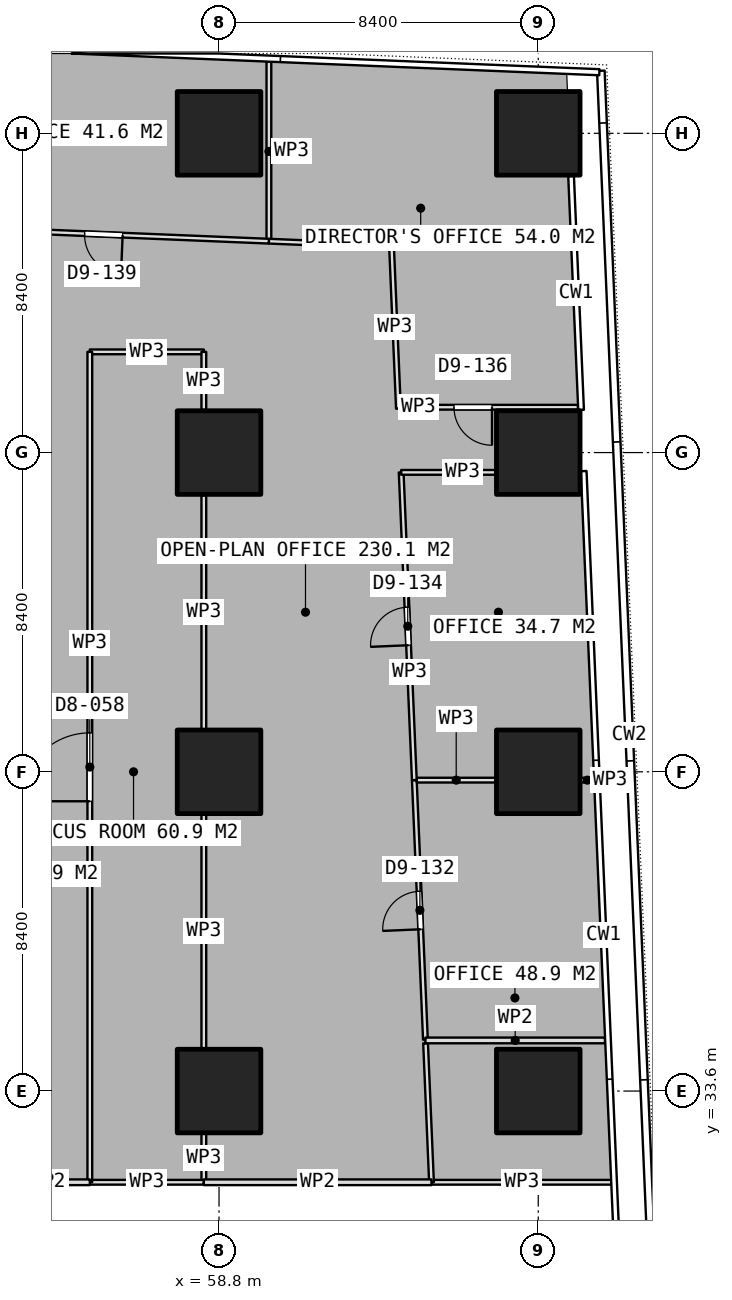
"""IFC4 building model, lengths in metres.
Left out: names, types, materials, properties, quantities, classifications, styles, units other than length and angle.
Written with IfcOpenShell. Run it as: python <this file> out.ifc"""

import sys

from ifc_helpers import new_model, si_unit, direction, frame, frame_2d, origin, origin_2d, place, context, subcontext, project, spatial, rectangle, extrude, element, fill, save


model = new_model("IFC4")
c1 = context("Model", 3, precision=1e-05, world=origin(), true_north=direction((0.0, 1.0)))
c2 = subcontext(c1, "Body", "Model", "MODEL_VIEW")
j1 = project(units=[si_unit("LENGTHUNIT", "METRE"), si_unit("PLANEANGLEUNIT", "RADIAN")], contexts=[c1])
p1 = place(None, origin())
s1 = spatial("IfcSite", under=j1, at=p1, CompositionType="ELEMENT")
p2 = place(p1, origin())
s2 = spatial("IfcBuilding", under=s1, at=p2, CompositionType="ELEMENT")
p3 = place(p2, frame((0.0, 0.0, 47.9)))
s3 = spatial("IfcBuildingStorey", under=s2, at=p3, CompositionType="ELEMENT", Elevation=47.9)
for number, where, z_axis, x_axis in (
    (1, (58.8, 33.6, 0.0), (0.0, 0.0, 1.0), (1.0, 0.0, 0.0)),
    (2, (58.8, 42.0, 0.0), (0.0, 0.0, 1.0), (1.0, 0.0, 0.0)),
    (3, (58.8, 50.4, 0.0), (0.0, 0.0, 1.0), (1.0, 0.0, 0.0)),
    (4, (58.8, 58.8, 0.0), (0.0, 0.0, 1.0), (1.0, 0.0, 0.0)),
    (5, (67.2, 33.6, 0.0), (0.0, 0.0, 1.0), (1.0, 0.0, 0.0)),
    (6, (67.2, 42.0, 0.0), (0.0, 0.0, 1.0), (1.0, 0.0, 0.0)),
    (7, (67.2, 50.4, 0.0), (0.0, 0.0, 1.0), (1.0, 0.0, 0.0)),
    (8, (67.2, 58.8, 0.0), (0.0, 0.0, 1.0), (1.0, 0.0, 0.0)),
):
    element("IfcColumn", number, at=place(p3, frame(where, z_axis=z_axis, x_axis=x_axis)), inside=s3, PredefinedType="COLUMN", context=c2, shape_type="SweptSolid", body=[
        extrude(rectangle(XDim=2.2, YDim=2.2, at=origin_2d()), origin(), (0.0, 0.0, 1.0), 3.75),
    ])
p4 = place(p3, frame((69.145, 31.2, 0.0), z_axis=(0.0, 0.0, 1.0), x_axis=(-1.0, 0.0, 0.0)))
e9 = element("IfcWall", 9, at=p4, inside=s3, PredefinedType="PARTITIONING", context=c2, shape_type="SweptSolid", body=[
    extrude(rectangle(XDim=4.754, YDim=0.125, at=frame_2d((2.377, 0.0))), origin(), (0.0, 0.0, 1.0), 3.5),
])
p5 = place(p3, frame((64.391, 31.2, 0.0), z_axis=(0.0, 0.0, 1.0), x_axis=(-0.042620959322, 0.999091314058, 0.0)))
e10 = element("IfcWall", 10, at=p5, inside=s3, PredefinedType="PARTITIONING", context=c2, shape_type="SweptSolid", body=[
    extrude(rectangle(XDim=3.66, YDim=0.125, at=frame_2d((1.83, 0.0))), origin(), (0.0, 0.0, 1.0), 3.5),
])
p6 = place(p3, frame((64.231, 34.954, 0.0), z_axis=(0.0, 0.0, 1.0), x_axis=(-0.042731736662, 0.999086582175, 0.0)))
e11 = element("IfcWall", 11, at=p6, inside=s3, PredefinedType="PARTITIONING", context=c2, shape_type="SweptSolid", body=[
    extrude(rectangle(XDim=6.833, YDim=0.125, at=frame_2d((3.417, 0.0))), origin(), (0.0, 0.0, 1.0), 3.5),
])
p7 = place(p6, frame((2.905, 0.0, 0.0)))
e12 = element("IfcOpeningElement", 12, at=p7, cuts=e11, PredefinedType="OPENING", context=c2, shape_type="SweptSolid", body=[
    extrude(rectangle(XDim=1.0, YDim=2.1, at=frame_2d((0.5, 1.05))), frame((0.0, 0.073, 0.0), z_axis=(0.0, -1.0, 0.0), x_axis=(1.0, 0.0, 0.0)), (0.0, 0.0, 1.0), 0.145),
])
p8 = place(p3, frame((64.002, 41.781, 0.0), z_axis=(0.0, 0.0, 1.0), x_axis=(1.0, 0.0, 0.0)))
e13 = element("IfcWall", 13, at=p8, inside=s3, PredefinedType="PARTITIONING", context=c2, shape_type="SweptSolid", body=[
    extrude(rectangle(XDim=2.078, YDim=0.125, at=frame_2d((1.039, 0.0))), origin(), (0.0, 0.0, 1.0), 3.5),
])
p9 = place(p3, frame((68.32, 41.781, 0.0), z_axis=(0.0, 0.0, 1.0), x_axis=(1.0, 0.0, 0.0)))
e14 = element("IfcWall", 14, at=p9, inside=s3, PredefinedType="PARTITIONING", context=c2, shape_type="SweptSolid", body=[
    extrude(rectangle(XDim=0.343, YDim=0.125, at=frame_2d((0.171, 0.0))), origin(), (0.0, 0.0, 1.0), 3.5),
])
p10 = place(p3, frame((63.939, 41.782, 0.0), z_axis=(0.0, 0.0, 1.0), x_axis=(-0.042686820675, 0.999088502256, 0.0)))
e15 = element("IfcWall", 15, at=p10, inside=s3, PredefinedType="PARTITIONING", context=c2, shape_type="SweptSolid", body=[
    extrude(rectangle(XDim=8.104, YDim=0.125, at=frame_2d((4.052, 0.0))), origin(), (0.0, 0.0, 1.0), 3.5),
])
p11 = place(p10, frame((3.552, 0.0, 0.0)))
e16 = element("IfcOpeningElement", 16, at=p11, cuts=e15, PredefinedType="OPENING", context=c2, shape_type="SweptSolid", body=[
    extrude(rectangle(XDim=1.0, YDim=2.1, at=frame_2d((0.5, 1.05))), frame((0.0, 0.073, 0.0), z_axis=(0.0, -1.0, 0.0), x_axis=(1.0, 0.0, 0.0)), (0.0, 0.0, 1.0), 0.145),
])
p12 = place(p3, frame((63.593, 49.879, 0.0), z_axis=(0.0, 0.0, 1.0), x_axis=(1.0, 0.0, 0.0)))
e17 = element("IfcWall", 17, at=p12, inside=s3, PredefinedType="PARTITIONING", context=c2, shape_type="SweptSolid", body=[
    extrude(rectangle(XDim=2.487, YDim=0.125, at=frame_2d((1.244, 0.0))), origin(), (0.0, 0.0, 1.0), 3.5),
])
p13 = place(p3, frame((60.112, 55.962, 0.0), z_axis=(0.0, 0.0, 1.0), x_axis=(0.0, 1.0, 0.0)))
e18 = element("IfcWall", 18, at=p13, inside=s3, PredefinedType="PARTITIONING", context=c2, shape_type="SweptSolid", body=[
    extrude(rectangle(XDim=4.724, YDim=0.125, at=frame_2d((2.362, 0.0))), origin(), (0.0, 0.0, 1.0), 3.5),
])
p14 = place(p3, frame((68.244, 51.593, 0.0), z_axis=(0.0, 0.0, 1.0), x_axis=(-1.0, 0.0, 0.0)))
e19 = element("IfcWall", 19, at=p14, inside=s3, PredefinedType="PARTITIONING", context=c2, shape_type="SweptSolid", body=[
    extrude(rectangle(XDim=4.662, YDim=0.125, at=frame_2d((2.331, 0.0))), origin(), (0.0, 0.0, 1.0), 3.5),
])
p15 = place(p14, frame((2.261, 0.0, 0.0)))
e20 = element("IfcOpeningElement", 20, at=p15, cuts=e19, PredefinedType="OPENING", context=c2, shape_type="SweptSolid", body=[
    extrude(rectangle(XDim=1.0, YDim=2.1, at=frame_2d((0.5, 1.05))), frame((0.0, 0.073, 0.0), z_axis=(0.0, -1.0, 0.0), x_axis=(1.0, 0.0, 0.0)), (0.0, 0.0, 1.0), 0.145),
])
p16 = place(p3, frame((63.521, 51.557, 0.0), z_axis=(0.0, 0.0, 1.0), x_axis=(-0.042535330456, 0.999094963286, 0.0)))
e21 = element("IfcWall", 21, at=p16, inside=s3, PredefinedType="PARTITIONING", context=c2, shape_type="SweptSolid", body=[
    extrude(rectangle(XDim=4.276, YDim=0.125, at=frame_2d((2.138, 0.0))), origin(), (0.0, 0.0, 1.0), 3.5),
])
p17 = place(p3, frame((63.339, 55.829, 0.0), z_axis=(0.0, 0.0, 1.0), x_axis=(-0.999154166221, 0.04112118826, 0.0)))
e22 = element("IfcWall", 22, at=p17, inside=s3, PredefinedType="PARTITIONING", context=c2, shape_type="SweptSolid", body=[
    extrude(rectangle(XDim=3.23, YDim=0.125, at=frame_2d((1.615, 0.0))), origin(), (0.0, 0.0, 1.0), 3.5),
])
p18 = place(p3, frame((60.111, 55.962, 0.0), z_axis=(0.0, 0.0, 1.0), x_axis=(-0.999152748928, 0.041155610913, 0.0)))
e23 = element("IfcWall", 23, at=p18, inside=s3, PredefinedType="PARTITIONING", context=c2, shape_type="SweptSolid", body=[
    extrude(rectangle(XDim=8.702, YDim=0.125, at=frame_2d((4.351, 0.0))), origin(), (0.0, 0.0, 1.0), 3.5),
])
p19 = place(p18, frame((3.851, 0.0, 0.0)))
e24 = element("IfcOpeningElement", 24, at=p19, cuts=e23, PredefinedType="OPENING", context=c2, shape_type="SweptSolid", body=[
    extrude(rectangle(XDim=1.0, YDim=2.1, at=frame_2d((0.5, 1.05))), frame((0.0, 0.073, 0.0), z_axis=(0.0, -1.0, 0.0), x_axis=(1.0, 0.0, 0.0)), (0.0, 0.0, 1.0), 0.145),
])
p20 = place(p3, frame((55.4, 53.05, 0.0), z_axis=(0.0, 0.0, 1.0), x_axis=(1.0, 0.0, 0.0)))
e25 = element("IfcWall", 25, at=p20, inside=s3, PredefinedType="PARTITIONING", context=c2, shape_type="SweptSolid", body=[
    extrude(rectangle(XDim=3.0, YDim=0.125, at=frame_2d((1.5, 0.0))), origin(), (0.0, 0.0, 1.0), 3.5),
])
p21 = place(p3, frame((58.4, 53.05, 0.0), z_axis=(0.0, 0.0, 1.0), x_axis=(0.0, -1.0, 0.0)))
e26 = element("IfcWall", 26, at=p21, inside=s3, PredefinedType="PARTITIONING", context=c2, shape_type="SweptSolid", body=[
    extrude(rectangle(XDim=1.53, YDim=0.125, at=frame_2d((0.765, 0.0))), origin(), (0.0, 0.0, 1.0), 3.5),
])
for number, where, z_axis, x_axis in (
    (27, (58.4, 49.28, 0.0), (0.0, 0.0, 1.0), (0.0, -1.0, 0.0)),
    (28, (58.4, 40.88, 0.0), (0.0, 0.0, 1.0), (0.0, -1.0, 0.0)),
):
    element("IfcWall", number, at=place(p3, frame(where, z_axis=z_axis, x_axis=x_axis)), inside=s3, PredefinedType="PARTITIONING", context=c2, shape_type="SweptSolid", body=[
        extrude(rectangle(XDim=6.16, YDim=0.125, at=frame_2d((3.08, 0.0))), origin(), (0.0, 0.0, 1.0), 3.5),
    ])
p22 = place(p3, frame((58.4, 32.48, 0.0), z_axis=(0.0, 0.0, 1.0), x_axis=(0.0, -1.0, 0.0)))
e29 = element("IfcWall", 29, at=p22, inside=s3, PredefinedType="PARTITIONING", context=c2, shape_type="SweptSolid", body=[
    extrude(rectangle(XDim=1.28, YDim=0.125, at=frame_2d((0.64, 0.0))), origin(), (0.0, 0.0, 1.0), 3.5),
])
p23 = place(p3, frame((58.4, 31.2, 0.0), z_axis=(0.0, 0.0, 1.0), x_axis=(-1.0, 0.0, 0.0)))
e30 = element("IfcWall", 30, at=p23, inside=s3, PredefinedType="PARTITIONING", context=c2, shape_type="SweptSolid", body=[
    extrude(rectangle(XDim=3.0, YDim=0.125, at=frame_2d((1.5, 0.0))), origin(), (0.0, 0.0, 1.0), 3.5),
])
p24 = place(p3, frame((55.4, 31.2, 0.0), z_axis=(0.0, 0.0, 1.0), x_axis=(0.0, 1.0, 0.0)))
e31 = element("IfcWall", 31, at=p24, inside=s3, PredefinedType="PARTITIONING", context=c2, shape_type="SweptSolid", body=[
    extrude(rectangle(XDim=21.85, YDim=0.125, at=frame_2d((10.925, 0.0))), origin(), (0.0, 0.0, 1.0), 3.5),
])
p25 = place(p24, frame((10.025, 0.0, 0.0)))
e32 = element("IfcOpeningElement", 32, at=p25, cuts=e31, PredefinedType="OPENING", context=c2, shape_type="SweptSolid", body=[
    extrude(rectangle(XDim=1.8, YDim=2.1, at=frame_2d((0.9, 1.05))), frame((0.0, 0.073, 0.0), z_axis=(0.0, -1.0, 0.0), x_axis=(1.0, 0.0, 0.0)), (0.0, 0.0, 1.0), 0.145),
])
p26 = place(p3, frame((64.231, 34.932, 0.0), z_axis=(0.0, 0.0, 1.0), x_axis=(1.0, 0.0, 0.0)))
e33 = element("IfcWall", 33, at=p26, inside=s3, PredefinedType="PARTITIONING", context=c2, shape_type="SweptSolid", body=[
    extrude(rectangle(XDim=4.725, YDim=0.15, at=frame_2d((2.363, 0.0))), origin(), (0.0, 0.0, 1.0), 3.5),
])
p27 = place(p3, frame((64.391, 31.2, 0.0), z_axis=(0.0, 0.0, 1.0), x_axis=(-1.0, 0.0, 0.0)))
e34 = element("IfcWall", 34, at=p27, inside=s3, PredefinedType="PARTITIONING", context=c2, shape_type="SweptSolid", body=[
    extrude(rectangle(XDim=5.991, YDim=0.15, at=frame_2d((2.996, 0.0))), origin(), (0.0, 0.0, 1.0), 3.5),
])
p28 = place(p3, frame((55.4, 31.2, 0.0), z_axis=(0.0, 0.0, 1.0), x_axis=(-1.0, 0.0, 0.0)))
e35 = element("IfcWall", 35, at=p28, inside=s3, PredefinedType="PARTITIONING", context=c2, shape_type="SweptSolid", body=[
    extrude(rectangle(XDim=2.2, YDim=0.15, at=frame_2d((1.1, 0.0))), origin(), (0.0, 0.0, 1.0), 3.5),
])
p29 = place(p7, origin())
e36 = element("IfcDoor", 36, at=p29, inside=s3, OperationType="SINGLE_SWING_LEFT", PredefinedType="DOOR", context=c2, shape_type="SweptSolid", body=[
    extrude(rectangle(XDim=1.0, YDim=2.1, at=frame_2d((0.5, 1.05))), frame((0.0, 0.025, 0.0), z_axis=(0.0, -1.0, 0.0), x_axis=(1.0, 0.0, 0.0)), (0.0, 0.0, 1.0), 0.05),
])
fill(e12, e36)
p30 = place(p11, origin())
e37 = element("IfcDoor", 37, at=p30, inside=s3, OperationType="SINGLE_SWING_LEFT", PredefinedType="DOOR", context=c2, shape_type="SweptSolid", body=[
    extrude(rectangle(XDim=1.0, YDim=2.1, at=frame_2d((0.5, 1.05))), frame((0.0, 0.025, 0.0), z_axis=(0.0, -1.0, 0.0), x_axis=(1.0, 0.0, 0.0)), (0.0, 0.0, 1.0), 0.05),
])
fill(e16, e37)
p31 = place(p15, origin())
e38 = element("IfcDoor", 38, at=p31, inside=s3, OperationType="SINGLE_SWING_LEFT", PredefinedType="DOOR", context=c2, shape_type="SweptSolid", body=[
    extrude(rectangle(XDim=1.0, YDim=2.1, at=frame_2d((0.5, 1.05))), frame((0.0, 0.025, 0.0), z_axis=(0.0, -1.0, 0.0), x_axis=(1.0, 0.0, 0.0)), (0.0, 0.0, 1.0), 0.05),
])
fill(e20, e38)
p32 = place(p19, origin())
e39 = element("IfcDoor", 39, at=p32, inside=s3, OperationType="SINGLE_SWING_LEFT", PredefinedType="DOOR", context=c2, shape_type="SweptSolid", body=[
    extrude(rectangle(XDim=1.0, YDim=2.1, at=frame_2d((0.5, 1.05))), frame((0.0, 0.025, 0.0), z_axis=(0.0, -1.0, 0.0), x_axis=(1.0, 0.0, 0.0)), (0.0, 0.0, 1.0), 0.05),
])
fill(e24, e39)
p33 = place(p25, origin())
e40 = element("IfcDoor", 40, at=p33, inside=s3, OperationType="DOUBLE_DOOR_SINGLE_SWING", PredefinedType="DOOR", context=c2, shape_type="SweptSolid", body=[
    extrude(rectangle(XDim=1.8, YDim=2.1, at=frame_2d((0.9, 1.05))), frame((0.0, 0.025, 0.0), z_axis=(0.0, -1.0, 0.0), x_axis=(1.0, 0.0, 0.0)), (0.0, 0.0, 1.0), 0.05),
])
fill(e32, e40)
save(model, sys.argv[1])
